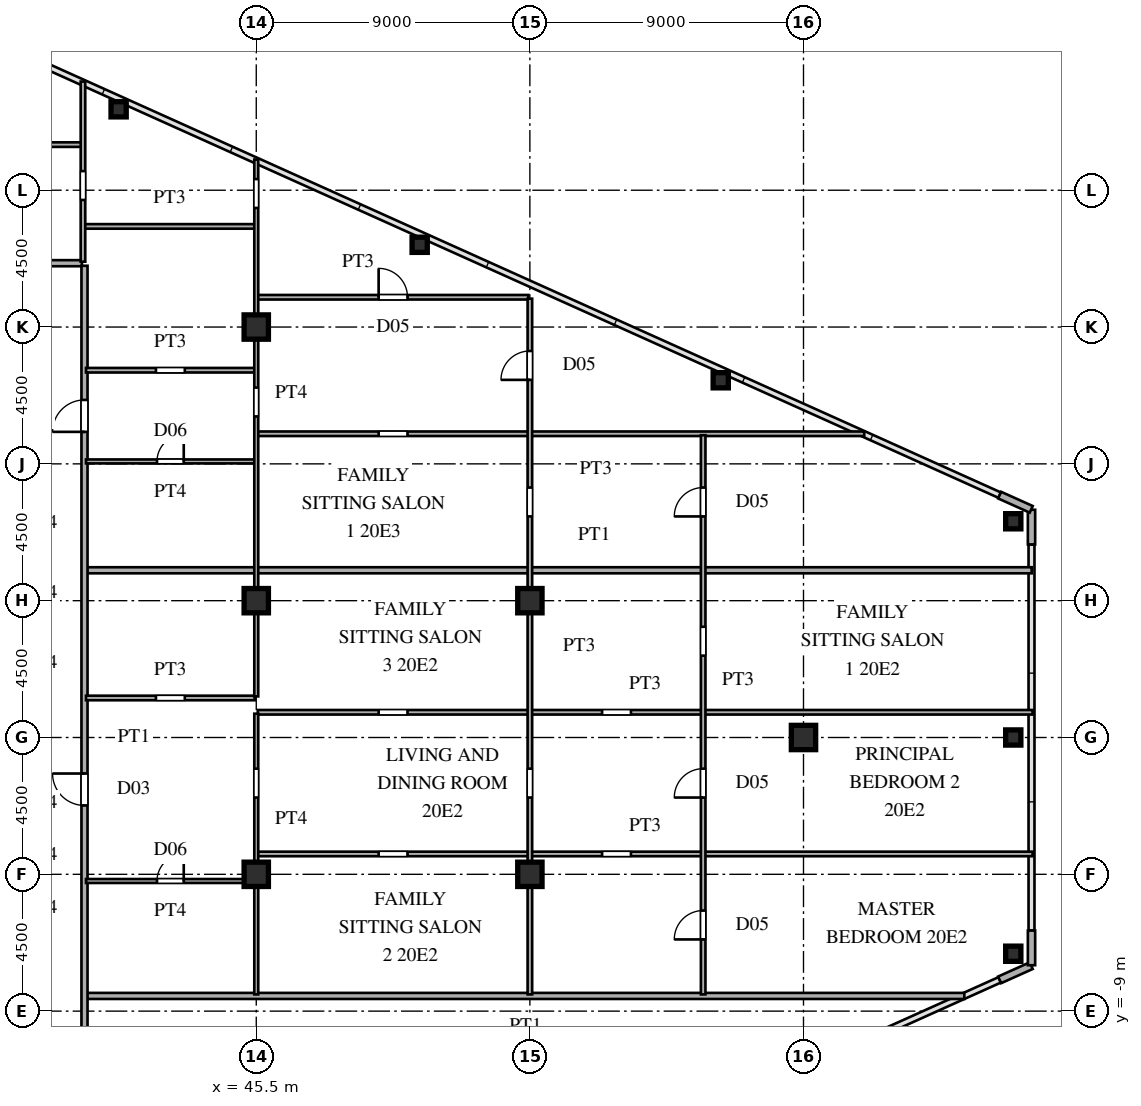
"""IFC4 building model, lengths in metres.
Left out: names, types, materials, properties, quantities, classifications, styles, units other than length and angle.
Written with IfcOpenShell. Run it as: python <this file> out.ifc"""

import sys

from ifc_helpers import new_model, si_unit, direction, frame, frame_2d, origin, origin_2d, place, context, subcontext, project, spatial, rectangle, hollow_rectangle, i_section, extrude, source, transform, mapped, element, fill, save


model = new_model("IFC4")
c1 = context("Model", 3, precision=1e-05, world=origin(), true_north=direction((0.0, 1.0)))
c2 = subcontext(c1, "Body", "Model", "MODEL_VIEW")
j1 = project(units=[si_unit("LENGTHUNIT", "METRE"), si_unit("PLANEANGLEUNIT", "RADIAN")], contexts=[c1])
p1 = place(None, origin())
s1 = spatial("IfcSite", under=j1, at=p1, CompositionType="ELEMENT")
p2 = place(p1, origin())
s2 = spatial("IfcBuilding", under=s1, at=p2, CompositionType="ELEMENT")
p3 = place(p2, frame((0.0, 0.0, 76.5)))
s3 = spatial("IfcBuildingStorey", under=s2, at=p3, CompositionType="ELEMENT", Elevation=76.5)
m1 = source(origin(), c2, "Body", "SweptSolid", [
    extrude(i_section(OverallWidth=0.8, OverallDepth=0.8, WebThickness=0.032, FlangeThickness=0.05, at=origin_2d()), origin(), (0.0, 0.0, 1.0), 3.6),
])
for number, where, z_axis, x_axis in (
    (1, (45.5, -4.5, 0.0), (0.0, 0.0, 1.0), (1.0, 0.0, 0.0)),
    (2, (45.5, 4.5, 0.0), (0.0, 0.0, 1.0), (1.0, 0.0, 0.0)),
    (3, (45.5, 13.5, 0.0), (0.0, 0.0, 1.0), (1.0, 0.0, 0.0)),
    (4, (54.5, -4.5, 0.0), (0.0, 0.0, 1.0), (1.0, 0.0, 0.0)),
    (5, (54.5, 4.5, 0.0), (0.0, 0.0, 1.0), (1.0, 0.0, 0.0)),
    (6, (63.5, 0.0, 0.0), (0.0, 0.0, 1.0), (1.0, 0.0, 0.0)),
):
    element("IfcColumn", number, at=place(p3, frame(where, z_axis=z_axis, x_axis=x_axis)), inside=s3, PredefinedType="COLUMN", context=c2, shape_type="MappedRepresentation", body=[
        mapped(m1, transform((0.0, 0.0, 0.0), scale=1.0)),
    ])
m2 = source(origin(), c2, "Body", "SweptSolid", [
    extrude(hollow_rectangle(XDim=0.5, YDim=0.5, WallThickness=0.02, at=origin_2d()), origin(), (0.0, 0.0, 1.0), 3.6),
])
for number, where, z_axis, x_axis in (
    (7, (70.4, -7.112, 0.0), (0.0, 0.0, 1.0), (1.0, 0.0, 0.0)),
    (8, (70.4, 7.112, 0.0), (0.0, 0.0, 1.0), (1.0, 0.0, 0.0)),
    (9, (40.973, 20.661, 0.0), (0.0, 0.0, 1.0), (1.0, 0.0, 0.0)),
    (10, (50.875, 16.205, 0.0), (0.0, 0.0, 1.0), (1.0, 0.0, 0.0)),
    (11, (60.778, 11.749, 0.0), (0.0, 0.0, 1.0), (1.0, 0.0, 0.0)),
    (12, (70.4, 0.0, 0.0), (0.0, 0.0, 1.0), (1.0, 0.0, 0.0)),
):
    element("IfcColumn", number, at=place(p3, frame(where, z_axis=z_axis, x_axis=x_axis)), inside=s3, PredefinedType="COLUMN", context=c2, shape_type="MappedRepresentation", body=[
        mapped(m2, transform((0.0, 0.0, 0.0), scale=1.0)),
    ])
for number, where, z_axis, x_axis in (
    (13, (69.951, -7.972, 0.0), (0.0, 0.0, 1.0), (0.912, 0.41, 0.0)),
    (14, (71.0, -7.49, 0.0), (0.0, 0.0, 1.0), (0.0, 1.0, 0.0)),
    (15, (71.0, 6.35, 0.0), (0.0, 0.0, 1.0), (0.0, 1.0, 0.0)),
    (16, (70.991, 7.504, 0.0), (0.0, 0.0, 1.0), (-0.912, 0.41, 0.0)),
):
    element("IfcWall", number, at=place(p3, frame(where, z_axis=z_axis, x_axis=x_axis)), inside=s3, PredefinedType="SOLIDWALL", context=c2, shape_type="SweptSolid", body=[
        extrude(rectangle(XDim=1.14, YDim=0.24, at=frame_2d((0.57, 0.0))), origin(), (0.0, 0.0, 1.0), 3.38),
    ])
p4 = place(p3, frame((39.93, -8.5, 0.0), z_axis=(0.0, 0.0, 1.0), x_axis=(1.0, 0.0, 0.0)))
e17 = element("IfcWall", 17, at=p4, inside=s3, PredefinedType="PARTITIONING", context=c2, shape_type="SweptSolid", body=[
    extrude(rectangle(XDim=28.86, YDim=0.2, at=frame_2d((14.43, 0.0))), origin(), (0.0, 0.0, 1.0), 3.38),
])
p5 = place(p3, frame((39.9, -4.72, 0.0), z_axis=(0.0, 0.0, 1.0), x_axis=(1.0, 0.0, 0.0)))
e18 = element("IfcWall", 18, at=p5, inside=s3, PredefinedType="PARTITIONING", context=c2, shape_type="SweptSolid", body=[
    extrude(rectangle(XDim=5.55, YDim=0.13, at=frame_2d((2.775, 0.0))), origin(), (0.0, 0.0, 1.0), 3.38),
])
p6 = place(p5, frame((2.335, 0.0, 0.0)))
e19 = element("IfcOpeningElement", 19, at=p6, cuts=e18, PredefinedType="OPENING", context=c2, shape_type="SweptSolid", body=[
    extrude(rectangle(XDim=0.88, YDim=2.1, at=frame_2d((0.44, 1.05))), frame((0.0, 0.075, 0.0), z_axis=(0.0, -1.0, 0.0), x_axis=(1.0, 0.0, 0.0)), (0.0, 0.0, 1.0), 0.15),
])
p7 = place(p3, frame((45.55, -3.83, 0.0), z_axis=(0.0, 0.0, 1.0), x_axis=(1.0, 0.0, 0.0)))
e20 = element("IfcWall", 20, at=p7, inside=s3, PredefinedType="PARTITIONING", context=c2, shape_type="SweptSolid", body=[
    extrude(rectangle(XDim=25.485, YDim=0.15, at=frame_2d((12.742, 0.0))), origin(), (0.0, 0.0, 1.0), 3.38),
])
p8 = place(p7, frame((3.975, 0.0, 0.0)))
e21 = element("IfcOpeningElement", 21, at=p8, cuts=e20, PredefinedType="OPENING", context=c2, shape_type="SweptSolid", body=[
    extrude(rectangle(XDim=0.95, YDim=2.15, at=frame_2d((0.475, 1.075))), frame((0.0, 0.085, 0.0), z_axis=(0.0, -1.0, 0.0), x_axis=(1.0, 0.0, 0.0)), (0.0, 0.0, 1.0), 0.17),
])
p9 = place(p7, frame((11.325, 0.0, 0.0)))
e22 = element("IfcOpeningElement", 22, at=p9, cuts=e20, PredefinedType="OPENING", context=c2, shape_type="SweptSolid", body=[
    extrude(rectangle(XDim=0.95, YDim=2.15, at=frame_2d((0.475, 1.075))), frame((0.0, 0.085, 0.0), z_axis=(0.0, -1.0, 0.0), x_axis=(1.0, 0.0, 0.0)), (0.0, 0.0, 1.0), 0.17),
])
p10 = place(p3, frame((45.55, 0.83, 0.0), z_axis=(0.0, 0.0, 1.0), x_axis=(1.0, 0.0, 0.0)))
e23 = element("IfcWall", 23, at=p10, inside=s3, PredefinedType="PARTITIONING", context=c2, shape_type="SweptSolid", body=[
    extrude(rectangle(XDim=25.485, YDim=0.15, at=frame_2d((12.742, 0.0))), origin(), (0.0, 0.0, 1.0), 3.38),
])
p11 = place(p10, frame((3.975, 0.0, 0.0)))
e24 = element("IfcOpeningElement", 24, at=p11, cuts=e23, PredefinedType="OPENING", context=c2, shape_type="SweptSolid", body=[
    extrude(rectangle(XDim=0.95, YDim=2.15, at=frame_2d((0.475, 1.075))), frame((0.0, 0.085, 0.0), z_axis=(0.0, -1.0, 0.0), x_axis=(1.0, 0.0, 0.0)), (0.0, 0.0, 1.0), 0.17),
])
p12 = place(p10, frame((11.325, 0.0, 0.0)))
e25 = element("IfcOpeningElement", 25, at=p12, cuts=e23, PredefinedType="OPENING", context=c2, shape_type="SweptSolid", body=[
    extrude(rectangle(XDim=0.95, YDim=2.15, at=frame_2d((0.475, 1.075))), frame((0.0, 0.085, 0.0), z_axis=(0.0, -1.0, 0.0), x_axis=(1.0, 0.0, 0.0)), (0.0, 0.0, 1.0), 0.17),
])
p13 = place(p3, frame((39.9, 1.3, 0.0), z_axis=(0.0, 0.0, 1.0), x_axis=(1.0, 0.0, 0.0)))
e26 = element("IfcWall", 26, at=p13, inside=s3, PredefinedType="PARTITIONING", context=c2, shape_type="SweptSolid", body=[
    extrude(rectangle(XDim=5.55, YDim=0.15, at=frame_2d((2.775, 0.0))), origin(), (0.0, 0.0, 1.0), 3.38),
])
p14 = place(p13, frame((2.3, 0.0, 0.0)))
e27 = element("IfcOpeningElement", 27, at=p14, cuts=e26, PredefinedType="OPENING", context=c2, shape_type="SweptSolid", body=[
    extrude(rectangle(XDim=0.95, YDim=2.15, at=frame_2d((0.475, 1.075))), frame((0.0, 0.085, 0.0), z_axis=(0.0, -1.0, 0.0), x_axis=(1.0, 0.0, 0.0)), (0.0, 0.0, 1.0), 0.17),
])
p15 = place(p3, frame((39.93, 5.5, 0.0), z_axis=(0.0, 0.0, 1.0), x_axis=(1.0, 0.0, 0.0)))
e28 = element("IfcWall", 28, at=p15, inside=s3, PredefinedType="PARTITIONING", context=c2, shape_type="SweptSolid", body=[
    extrude(rectangle(XDim=31.075, YDim=0.2, at=frame_2d((15.538, 0.0))), origin(), (0.0, 0.0, 1.0), 3.38),
])
p16 = place(p3, frame((39.9, 9.08, 0.0), z_axis=(0.0, 0.0, 1.0), x_axis=(1.0, 0.0, 0.0)))
e29 = element("IfcWall", 29, at=p16, inside=s3, PredefinedType="PARTITIONING", context=c2, shape_type="SweptSolid", body=[
    extrude(rectangle(XDim=5.55, YDim=0.13, at=frame_2d((2.775, 0.0))), origin(), (0.0, 0.0, 1.0), 3.38),
])
p17 = place(p16, frame((2.335, 0.0, 0.0)))
e30 = element("IfcOpeningElement", 30, at=p17, cuts=e29, PredefinedType="OPENING", context=c2, shape_type="SweptSolid", body=[
    extrude(rectangle(XDim=0.88, YDim=2.1, at=frame_2d((0.44, 1.05))), frame((0.0, 0.075, 0.0), z_axis=(0.0, -1.0, 0.0), x_axis=(1.0, 0.0, 0.0)), (0.0, 0.0, 1.0), 0.15),
])
p18 = place(p3, frame((45.55, 9.99, 0.0), z_axis=(0.0, 0.0, 1.0), x_axis=(1.0, 0.0, 0.0)))
e31 = element("IfcWall", 31, at=p18, inside=s3, PredefinedType="PARTITIONING", context=c2, shape_type="SweptSolid", body=[
    extrude(rectangle(XDim=19.948, YDim=0.15, at=frame_2d((9.974, 0.0))), origin(), (0.0, 0.0, 1.0), 3.38),
])
p19 = place(p18, frame((3.975, 0.0, 0.0)))
e32 = element("IfcOpeningElement", 32, at=p19, cuts=e31, PredefinedType="OPENING", context=c2, shape_type="SweptSolid", body=[
    extrude(rectangle(XDim=0.95, YDim=2.15, at=frame_2d((0.475, 1.075))), frame((0.0, 0.085, 0.0), z_axis=(0.0, -1.0, 0.0), x_axis=(1.0, 0.0, 0.0)), (0.0, 0.0, 1.0), 0.17),
])
p20 = place(p3, frame((39.9, 12.08, 0.0), z_axis=(0.0, 0.0, 1.0), x_axis=(1.0, 0.0, 0.0)))
e33 = element("IfcWall", 33, at=p20, inside=s3, PredefinedType="PARTITIONING", context=c2, shape_type="SweptSolid", body=[
    extrude(rectangle(XDim=5.55, YDim=0.15, at=frame_2d((2.775, 0.0))), origin(), (0.0, 0.0, 1.0), 3.38),
])
p21 = place(p20, frame((2.3, 0.0, 0.0)))
e34 = element("IfcOpeningElement", 34, at=p21, cuts=e33, PredefinedType="OPENING", context=c2, shape_type="SweptSolid", body=[
    extrude(rectangle(XDim=0.95, YDim=2.15, at=frame_2d((0.475, 1.075))), frame((0.0, 0.085, 0.0), z_axis=(0.0, -1.0, 0.0), x_axis=(1.0, 0.0, 0.0)), (0.0, 0.0, 1.0), 0.17),
])
p22 = place(p3, frame((45.55, 14.48, 0.0), z_axis=(0.0, 0.0, 1.0), x_axis=(1.0, 0.0, 0.0)))
e35 = element("IfcWall", 35, at=p22, inside=s3, PredefinedType="PARTITIONING", context=c2, shape_type="SweptSolid", body=[
    extrude(rectangle(XDim=8.9, YDim=0.15, at=frame_2d((4.45, 0.0))), origin(), (0.0, 0.0, 1.0), 3.38),
])
p23 = place(p22, frame((3.975, 0.0, 0.0)))
e36 = element("IfcOpeningElement", 36, at=p23, cuts=e35, PredefinedType="OPENING", context=c2, shape_type="SweptSolid", body=[
    extrude(rectangle(XDim=0.95, YDim=2.15, at=frame_2d((0.475, 1.075))), frame((0.0, 0.085, 0.0), z_axis=(0.0, -1.0, 0.0), x_axis=(1.0, 0.0, 0.0)), (0.0, 0.0, 1.0), 0.17),
])
p24 = place(p3, frame((36.585, 15.6, 0.0), z_axis=(0.0, 0.0, 1.0), x_axis=(1.0, 0.0, 0.0)))
e37 = element("IfcWall", 37, at=p24, inside=s3, PredefinedType="PARTITIONING", context=c2, shape_type="SweptSolid", body=[
    extrude(rectangle(XDim=3.18, YDim=0.2, at=frame_2d((1.59, 0.0))), origin(), (0.0, 0.0, 1.0), 3.38),
])
p25 = place(p3, frame((39.85, 16.81, 0.0), z_axis=(0.0, 0.0, 1.0), x_axis=(1.0, 0.0, 0.0)))
e38 = element("IfcWall", 38, at=p25, inside=s3, PredefinedType="PARTITIONING", context=c2, shape_type="SweptSolid", body=[
    extrude(rectangle(XDim=5.6, YDim=0.15, at=frame_2d((2.8, 0.0))), origin(), (0.0, 0.0, 1.0), 3.38),
])
p26 = place(p3, frame((27.465, 19.5, 0.0), z_axis=(0.0, 0.0, 1.0), x_axis=(1.0, 0.0, 0.0)))
e39 = element("IfcWall", 39, at=p26, inside=s3, PredefinedType="PARTITIONING", context=c2, shape_type="SweptSolid", body=[
    extrude(rectangle(XDim=12.285, YDim=0.15, at=frame_2d((6.143, 0.0))), origin(), (0.0, 0.0, 1.0), 3.38),
])
p27 = place(p26, frame((5.71, 0.0, 0.0)))
e40 = element("IfcOpeningElement", 40, at=p27, cuts=e39, PredefinedType="OPENING", context=c2, shape_type="SweptSolid", body=[
    extrude(rectangle(XDim=0.95, YDim=2.15, at=frame_2d((0.475, 1.075))), frame((0.0, 0.085, 0.0), z_axis=(0.0, -1.0, 0.0), x_axis=(1.0, 0.0, 0.0)), (0.0, 0.0, 1.0), 0.17),
])
p28 = place(p3, frame((39.8, 15.65, 0.0), z_axis=(0.0, 0.0, 1.0), x_axis=(0.0, 1.0, 0.0)))
e41 = element("IfcWall", 41, at=p28, inside=s3, PredefinedType="PARTITIONING", context=c2, shape_type="SweptSolid", body=[
    extrude(rectangle(XDim=5.925, YDim=0.15, at=frame_2d((2.962, 0.0))), origin(), (0.0, 0.0, 1.0), 3.38),
])
p29 = place(p28, frame((2.029, 0.0, 0.0)))
e42 = element("IfcOpeningElement", 42, at=p29, cuts=e41, PredefinedType="OPENING", context=c2, shape_type="SweptSolid", body=[
    extrude(rectangle(XDim=0.95, YDim=2.15, at=frame_2d((0.475, 1.075))), frame((0.0, 0.085, 0.0), z_axis=(0.0, -1.0, 0.0), x_axis=(1.0, 0.0, 0.0)), (0.0, 0.0, 1.0), 0.17),
])
p30 = place(p3, frame((39.85, -15.515, 0.0), z_axis=(0.0, 0.0, 1.0), x_axis=(0.0, 1.0, 0.0)))
e43 = element("IfcWall", 43, at=p30, inside=s3, PredefinedType="PARTITIONING", context=c2, shape_type="SweptSolid", body=[
    extrude(rectangle(XDim=31.03, YDim=0.2, at=frame_2d((15.515, 0.0))), origin(), (0.0, 0.0, 1.0), 3.38),
])
p31 = place(p30, frame((2.94, 0.0, 0.0)))
e44 = element("IfcOpeningElement", 44, at=p31, cuts=e43, PredefinedType="OPENING", context=c2, shape_type="SweptSolid", body=[
    extrude(rectangle(XDim=1.05, YDim=2.25, at=frame_2d((0.525, 1.125))), frame((0.0, 0.11, 0.0), z_axis=(0.0, -1.0, 0.0), x_axis=(1.0, 0.0, 0.0)), (0.0, 0.0, 1.0), 0.22),
])
p32 = place(p30, frame((13.28, 0.0, 0.0)))
e45 = element("IfcOpeningElement", 45, at=p32, cuts=e43, PredefinedType="OPENING", context=c2, shape_type="SweptSolid", body=[
    extrude(rectangle(XDim=1.05, YDim=2.25, at=frame_2d((0.525, 1.125))), frame((0.0, 0.11, 0.0), z_axis=(0.0, -1.0, 0.0), x_axis=(1.0, 0.0, 0.0)), (0.0, 0.0, 1.0), 0.22),
])
p33 = place(p30, frame((25.567, 0.0, 0.0)))
e46 = element("IfcOpeningElement", 46, at=p33, cuts=e43, PredefinedType="OPENING", context=c2, shape_type="SweptSolid", body=[
    extrude(rectangle(XDim=1.05, YDim=2.25, at=frame_2d((0.525, 1.125))), frame((0.0, 0.11, 0.0), z_axis=(0.0, -1.0, 0.0), x_axis=(1.0, 0.0, 0.0)), (0.0, 0.0, 1.0), 0.22),
])
p34 = place(p3, frame((45.5, -8.45, 0.0), z_axis=(0.0, 0.0, 1.0), x_axis=(0.0, 1.0, 0.0)))
e47 = element("IfcWall", 47, at=p34, inside=s3, PredefinedType="PARTITIONING", context=c2, shape_type="SweptSolid", body=[
    extrude(rectangle(XDim=9.233, YDim=0.13, at=frame_2d((4.616, 0.0))), origin(), (0.0, 0.0, 1.0), 2.68),
])
p35 = place(p34, frame((6.475, 0.0, 0.0)))
e48 = element("IfcOpeningElement", 48, at=p35, cuts=e47, PredefinedType="OPENING", context=c2, shape_type="SweptSolid", body=[
    extrude(rectangle(XDim=0.95, YDim=2.15, at=frame_2d((0.475, 1.075))), frame((0.0, 0.075, 0.0), z_axis=(0.0, -1.0, 0.0), x_axis=(1.0, 0.0, 0.0)), (0.0, 0.0, 1.0), 0.15),
])
p36 = place(p3, frame((45.5, 1.352, 0.0), z_axis=(0.0, 0.0, 1.0), x_axis=(0.0, 1.0, 0.0)))
e49 = element("IfcWall", 49, at=p36, inside=s3, PredefinedType="PARTITIONING", context=c2, shape_type="SweptSolid", body=[
    extrude(rectangle(XDim=17.658, YDim=0.13, at=frame_2d((8.829, 0.0))), origin(), (0.0, 0.0, 1.0), 2.68),
])
p37 = place(p36, frame((9.208, 0.0, 0.0)))
e50 = element("IfcOpeningElement", 50, at=p37, cuts=e49, PredefinedType="OPENING", context=c2, shape_type="SweptSolid", body=[
    extrude(rectangle(XDim=0.95, YDim=2.15, at=frame_2d((0.475, 1.075))), frame((0.0, 0.075, 0.0), z_axis=(0.0, -1.0, 0.0), x_axis=(1.0, 0.0, 0.0)), (0.0, 0.0, 1.0), 0.15),
])
p38 = place(p36, frame((16.065, 0.0, 0.0)))
e51 = element("IfcOpeningElement", 51, at=p38, cuts=e49, PredefinedType="OPENING", context=c2, shape_type="SweptSolid", body=[
    extrude(rectangle(XDim=0.95, YDim=2.15, at=frame_2d((0.475, 1.075))), frame((0.0, 0.075, 0.0), z_axis=(0.0, -1.0, 0.0), x_axis=(1.0, 0.0, 0.0)), (0.0, 0.0, 1.0), 0.15),
])
p39 = place(p3, frame((54.5, -8.45, 0.0), z_axis=(0.0, 0.0, 1.0), x_axis=(0.0, 1.0, 0.0)))
e52 = element("IfcWall", 52, at=p39, inside=s3, PredefinedType="PARTITIONING", context=c2, shape_type="SweptSolid", body=[
    extrude(rectangle(XDim=22.883, YDim=0.15, at=frame_2d((11.441, 0.0))), origin(), (0.0, 0.0, 1.0), 2.68),
])
p40 = place(p39, frame((6.475, 0.0, 0.0)))
e53 = element("IfcOpeningElement", 53, at=p40, cuts=e52, PredefinedType="OPENING", context=c2, shape_type="SweptSolid", body=[
    extrude(rectangle(XDim=0.95, YDim=2.15, at=frame_2d((0.475, 1.075))), frame((0.0, 0.085, 0.0), z_axis=(0.0, -1.0, 0.0), x_axis=(1.0, 0.0, 0.0)), (0.0, 0.0, 1.0), 0.17),
])
p41 = place(p39, frame((20.212, 0.0, 0.0)))
e54 = element("IfcOpeningElement", 54, at=p41, cuts=e52, PredefinedType="OPENING", context=c2, shape_type="SweptSolid", body=[
    extrude(rectangle(XDim=0.95, YDim=2.15, at=frame_2d((0.475, 1.075))), frame((0.0, 0.085, 0.0), z_axis=(0.0, -1.0, 0.0), x_axis=(1.0, 0.0, 0.0)), (0.0, 0.0, 1.0), 0.17),
])
p42 = place(p39, frame((15.721, 0.0, 0.0)))
e55 = element("IfcOpeningElement", 55, at=p42, cuts=e52, PredefinedType="OPENING", context=c2, shape_type="SweptSolid", body=[
    extrude(rectangle(XDim=0.95, YDim=2.15, at=frame_2d((0.475, 1.075))), frame((0.0, 0.085, 0.0), z_axis=(0.0, -1.0, 0.0), x_axis=(1.0, 0.0, 0.0)), (0.0, 0.0, 1.0), 0.17),
])
p43 = place(p3, frame((60.2, -8.45, 0.0), z_axis=(0.0, 0.0, 1.0), x_axis=(0.0, 1.0, 0.0)))
e56 = element("IfcWall", 56, at=p43, inside=s3, PredefinedType="PARTITIONING", context=c2, shape_type="SweptSolid", body=[
    extrude(rectangle(XDim=18.392, YDim=0.15, at=frame_2d((9.196, 0.0))), origin(), (0.0, 0.0, 1.0), 3.38),
])
p44 = place(p43, frame((1.808, 0.0, 0.0)))
e57 = element("IfcOpeningElement", 57, at=p44, cuts=e56, PredefinedType="OPENING", context=c2, shape_type="SweptSolid", body=[
    extrude(rectangle(XDim=0.95, YDim=2.15, at=frame_2d((0.475, 1.075))), frame((0.0, 0.085, 0.0), z_axis=(0.0, -1.0, 0.0), x_axis=(1.0, 0.0, 0.0)), (0.0, 0.0, 1.0), 0.17),
])
p45 = place(p43, frame((6.475, 0.0, 0.0)))
e58 = element("IfcOpeningElement", 58, at=p45, cuts=e56, PredefinedType="OPENING", context=c2, shape_type="SweptSolid", body=[
    extrude(rectangle(XDim=0.95, YDim=2.15, at=frame_2d((0.475, 1.075))), frame((0.0, 0.085, 0.0), z_axis=(0.0, -1.0, 0.0), x_axis=(1.0, 0.0, 0.0)), (0.0, 0.0, 1.0), 0.17),
])
p46 = place(p43, frame((11.142, 0.0, 0.0)))
e59 = element("IfcOpeningElement", 59, at=p46, cuts=e56, PredefinedType="OPENING", context=c2, shape_type="SweptSolid", body=[
    extrude(rectangle(XDim=0.95, YDim=2.15, at=frame_2d((0.475, 1.075))), frame((0.0, 0.085, 0.0), z_axis=(0.0, -1.0, 0.0), x_axis=(1.0, 0.0, 0.0)), (0.0, 0.0, 1.0), 0.17),
])
p47 = place(p43, frame((15.721, 0.0, 0.0)))
e60 = element("IfcOpeningElement", 60, at=p47, cuts=e56, PredefinedType="OPENING", context=c2, shape_type="SweptSolid", body=[
    extrude(rectangle(XDim=0.95, YDim=2.15, at=frame_2d((0.475, 1.075))), frame((0.0, 0.085, 0.0), z_axis=(0.0, -1.0, 0.0), x_axis=(1.0, 0.0, 0.0)), (0.0, 0.0, 1.0), 0.17),
])
m3 = source(origin(), c2, "Body", "SweptSolid", [
    extrude(rectangle(XDim=0.88, YDim=2.1, at=frame_2d((0.44, 1.05))), frame((0.0, 0.025, 0.0), z_axis=(0.0, -1.0, 0.0), x_axis=(1.0, 0.0, 0.0)), (0.0, 0.0, 1.0), 0.05),
])
p48 = place(p6, origin())
e61 = element("IfcDoor", 61, at=p48, inside=s3, OperationType="SINGLE_SWING_RIGHT", PredefinedType="DOOR", context=c2, shape_type="MappedRepresentation", body=[
    mapped(m3, transform((0.0, 0.0, 0.0), scale=1.0)),
])
fill(e19, e61)
p49 = place(p17, origin())
e62 = element("IfcDoor", 62, at=p49, inside=s3, OperationType="SINGLE_SWING_RIGHT", PredefinedType="DOOR", context=c2, shape_type="MappedRepresentation", body=[
    mapped(m3, transform((0.0, 0.0, 0.0), scale=1.0)),
])
fill(e30, e62)
m4 = source(origin(), c2, "Body", "SweptSolid", [
    extrude(rectangle(XDim=0.95, YDim=2.15, at=frame_2d((0.475, 1.075))), frame((0.0, 0.025, 0.0), z_axis=(0.0, -1.0, 0.0), x_axis=(1.0, 0.0, 0.0)), (0.0, 0.0, 1.0), 0.05),
])
p50 = place(p23, origin())
e63 = element("IfcDoor", 63, at=p50, inside=s3, OperationType="SINGLE_SWING_LEFT", PredefinedType="DOOR", context=c2, shape_type="MappedRepresentation", body=[
    mapped(m4, transform((0.0, 0.0, 0.0), scale=1.0)),
])
fill(e36, e63)
m5 = source(origin(), c2, "Body", "SweptSolid", [
    extrude(rectangle(XDim=1.05, YDim=2.25, at=frame_2d((0.525, 1.125))), frame((0.0, 0.025, 0.0), z_axis=(0.0, -1.0, 0.0), x_axis=(1.0, 0.0, 0.0)), (0.0, 0.0, 1.0), 0.05),
])
p51 = place(p32, origin())
e64 = element("IfcDoor", 64, at=p51, inside=s3, OperationType="SINGLE_SWING_RIGHT", PredefinedType="DOOR", context=c2, shape_type="MappedRepresentation", body=[
    mapped(m5, transform((0.0, 0.0, 0.0), scale=1.0)),
])
fill(e45, e64)
p52 = place(p33, origin())
e65 = element("IfcDoor", 65, at=p52, inside=s3, OperationType="SINGLE_SWING_LEFT", PredefinedType="DOOR", context=c2, shape_type="MappedRepresentation", body=[
    mapped(m5, transform((0.0, 0.0, 0.0), scale=1.0)),
])
fill(e46, e65)
p53 = place(p41, origin())
e66 = element("IfcDoor", 66, at=p53, inside=s3, OperationType="SINGLE_SWING_LEFT", PredefinedType="DOOR", context=c2, shape_type="MappedRepresentation", body=[
    mapped(m4, transform((0.0, 0.0, 0.0), scale=1.0)),
])
fill(e54, e66)
p54 = place(p44, origin())
e67 = element("IfcDoor", 67, at=p54, inside=s3, OperationType="SINGLE_SWING_LEFT", PredefinedType="DOOR", context=c2, shape_type="MappedRepresentation", body=[
    mapped(m4, transform((0.0, 0.0, 0.0), scale=1.0)),
])
fill(e57, e67)
p55 = place(p45, origin())
e68 = element("IfcDoor", 68, at=p55, inside=s3, OperationType="SINGLE_SWING_LEFT", PredefinedType="DOOR", context=c2, shape_type="MappedRepresentation", body=[
    mapped(m4, transform((0.0, 0.0, 0.0), scale=1.0)),
])
fill(e58, e68)
p56 = place(p47, origin())
e69 = element("IfcDoor", 69, at=p56, inside=s3, OperationType="SINGLE_SWING_LEFT", PredefinedType="DOOR", context=c2, shape_type="MappedRepresentation", body=[
    mapped(m4, transform((0.0, 0.0, 0.0), scale=1.0)),
])
fill(e60, e69)
save(model, sys.argv[1])
